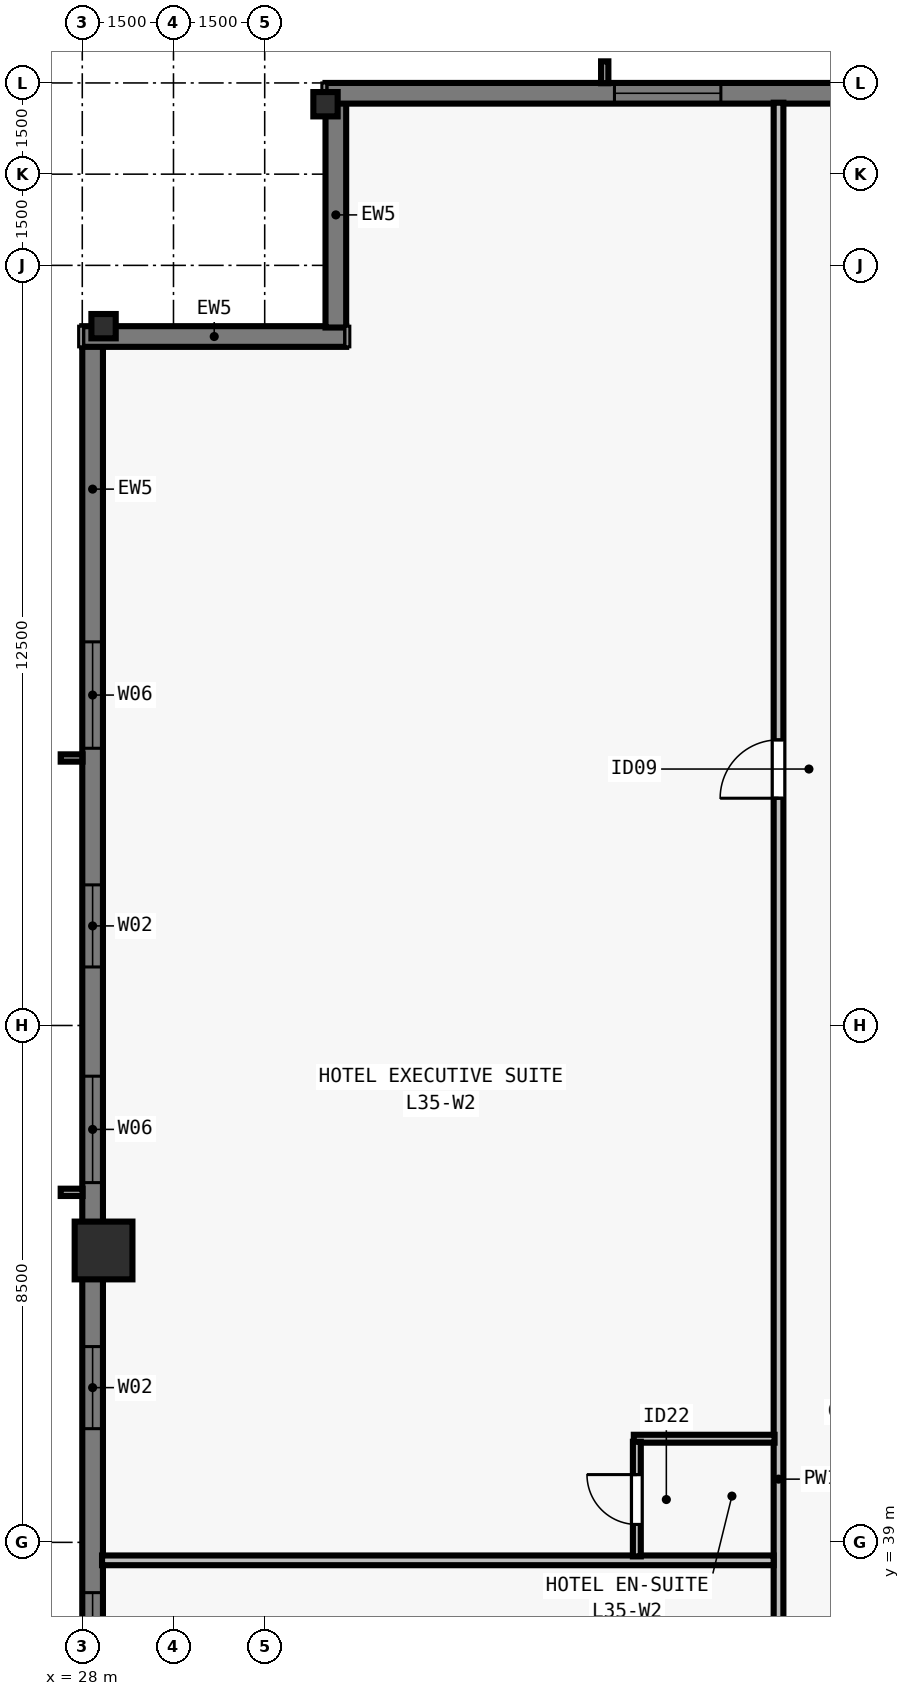
"""IFC4 building model, lengths in metres.
Left out: names, types, materials, properties, quantities, classifications, styles, units other than length and angle.
Written with IfcOpenShell. Run it as: python <this file> out.ifc"""

import sys

from ifc_helpers import new_model, si_unit, direction, frame, frame_2d, origin, origin_2d, place, context, subcontext, project, spatial, rectangle, i_section, extrude, element, fill, save


model = new_model("IFC4")
c1 = context("Model", 3, precision=1e-05, world=origin(), true_north=direction((0.0, 1.0)))
c2 = subcontext(c1, "Body", "Model", "MODEL_VIEW")
j1 = project(units=[si_unit("LENGTHUNIT", "METRE"), si_unit("PLANEANGLEUNIT", "RADIAN")], contexts=[c1])
p1 = place(None, origin())
s1 = spatial("IfcSite", under=j1, at=p1, CompositionType="ELEMENT")
p2 = place(p1, origin())
s2 = spatial("IfcBuilding", under=s1, at=p2, CompositionType="ELEMENT")
p3 = place(p2, frame((0.0, 0.0, 130.5)))
s3 = spatial("IfcBuildingStorey", under=s2, at=p3, CompositionType="ELEMENT", Elevation=130.5)
for number, where, z_axis, x_axis in (
    (1, (32.0, 62.65, 0.0), (0.0, 0.0, 1.0), (1.0, 0.0, 0.0)),
    (2, (28.35, 59.0, 0.0), (0.0, 0.0, 1.0), (0.0, 1.0, 0.0)),
):
    element("IfcColumn", number, at=place(p3, frame(where, z_axis=z_axis, x_axis=x_axis)), inside=s3, PredefinedType="COLUMN", context=c2, shape_type="SweptSolid", body=[
        extrude(i_section(OverallWidth=0.4, OverallDepth=0.4, WebThickness=0.022, FlangeThickness=0.036, at=origin_2d()), origin(), (0.0, 0.0, 1.0), 3.5),
    ])
p4 = place(p3, frame((28.35, 43.8, 0.0), z_axis=(0.0, 0.0, 1.0), x_axis=(0.0, 1.0, 0.0)))
e3 = element("IfcColumn", 3, at=p4, inside=s3, PredefinedType="COLUMN", context=c2, shape_type="SweptSolid", body=[
    extrude(rectangle(XDim=0.95, YDim=0.95, at=origin_2d()), origin(), (0.0, 0.0, 1.0), 3.5),
])
p5 = place(p3, frame((28.17, 32.0, 0.0), z_axis=(0.0, 0.0, 1.0), x_axis=(0.0, 1.0, 0.0)))
e4 = element("IfcWall", 4, at=p5, inside=s3, PredefinedType="SOLIDWALL", context=c2, shape_type="SweptSolid", body=[
    extrude(rectangle(XDim=26.682, YDim=0.34, at=frame_2d((13.341, 0.0))), origin(), (0.0, 0.0, 1.0), 3.28),
])
p6 = place(p5, frame((4.423, 0.0, 0.8)))
e5 = element("IfcOpeningElement", 5, at=p6, cuts=e4, PredefinedType="OPENING", context=c2, shape_type="SweptSolid", body=[
    extrude(rectangle(XDim=1.75, YDim=1.66, at=frame_2d((0.875, 0.83))), frame((0.0, 0.18, 0.0), z_axis=(0.0, -1.0, 0.0), x_axis=(1.0, 0.0, 0.0)), (0.0, 0.0, 1.0), 0.36),
])
p7 = place(p5, frame((8.87, 0.0, 0.8)))
e6 = element("IfcOpeningElement", 6, at=p7, cuts=e4, PredefinedType="OPENING", context=c2, shape_type="SweptSolid", body=[
    extrude(rectangle(XDim=1.35, YDim=1.66, at=frame_2d((0.675, 0.83))), frame((0.0, 0.18, 0.0), z_axis=(0.0, -1.0, 0.0), x_axis=(1.0, 0.0, 0.0)), (0.0, 0.0, 1.0), 0.36),
])
p8 = place(p5, frame((12.916, 0.0, 0.8)))
e7 = element("IfcOpeningElement", 7, at=p8, cuts=e4, PredefinedType="OPENING", context=c2, shape_type="SweptSolid", body=[
    extrude(rectangle(XDim=1.75, YDim=1.66, at=frame_2d((0.875, 0.83))), frame((0.0, 0.18, 0.0), z_axis=(0.0, -1.0, 0.0), x_axis=(1.0, 0.0, 0.0)), (0.0, 0.0, 1.0), 0.36),
])
p9 = place(p5, frame((16.462, 0.0, 0.8)))
e8 = element("IfcOpeningElement", 8, at=p9, cuts=e4, PredefinedType="OPENING", context=c2, shape_type="SweptSolid", body=[
    extrude(rectangle(XDim=1.35, YDim=1.66, at=frame_2d((0.675, 0.83))), frame((0.0, 0.18, 0.0), z_axis=(0.0, -1.0, 0.0), x_axis=(1.0, 0.0, 0.0)), (0.0, 0.0, 1.0), 0.36),
])
p10 = place(p5, frame((20.059, 0.0, 0.8)))
e9 = element("IfcOpeningElement", 9, at=p10, cuts=e4, PredefinedType="OPENING", context=c2, shape_type="SweptSolid", body=[
    extrude(rectangle(XDim=1.75, YDim=1.66, at=frame_2d((0.875, 0.83))), frame((0.0, 0.18, 0.0), z_axis=(0.0, -1.0, 0.0), x_axis=(1.0, 0.0, 0.0)), (0.0, 0.0, 1.0), 0.36),
])
p11 = place(p3, frame((28.0, 58.83, 0.0), z_axis=(0.0, 0.0, 1.0), x_axis=(1.0, 0.0, 0.0)))
e10 = element("IfcWall", 10, at=p11, inside=s3, PredefinedType="SOLIDWALL", context=c2, shape_type="SweptSolid", body=[
    extrude(rectangle(XDim=4.34, YDim=0.34, at=frame_2d((2.17, 0.0))), origin(), (0.0, 0.0, 1.0), 3.28),
])
p12 = place(p3, frame((32.17, 58.978, 0.0), z_axis=(0.0, 0.0, 1.0), x_axis=(0.0, 1.0, 0.0)))
e11 = element("IfcWall", 11, at=p12, inside=s3, PredefinedType="SOLIDWALL", context=c2, shape_type="SweptSolid", body=[
    extrude(rectangle(XDim=3.704, YDim=0.34, at=frame_2d((1.852, 0.0))), origin(), (0.0, 0.0, 1.0), 3.28),
])
p13 = place(p3, frame((32.0, 62.83, 0.0), z_axis=(0.0, 0.0, 1.0), x_axis=(1.0, 0.0, 0.0)))
e12 = element("IfcWall", 12, at=p13, inside=s3, PredefinedType="SOLIDWALL", context=c2, shape_type="SweptSolid", body=[
    extrude(rectangle(XDim=39.682, YDim=0.34, at=frame_2d((19.841, 0.0))), origin(), (0.0, 0.0, 1.0), 3.28),
])
p14 = place(p13, frame((4.752, 0.0, 0.8)))
e13 = element("IfcOpeningElement", 13, at=p14, cuts=e12, PredefinedType="OPENING", context=c2, shape_type="SweptSolid", body=[
    extrude(rectangle(XDim=1.75, YDim=1.66, at=frame_2d((0.875, 0.83))), frame((0.0, 0.18, 0.0), z_axis=(0.0, -1.0, 0.0), x_axis=(1.0, 0.0, 0.0)), (0.0, 0.0, 1.0), 0.36),
])
p15 = place(p13, frame((11.859, 0.0, 0.8)))
e14 = element("IfcOpeningElement", 14, at=p15, cuts=e12, PredefinedType="OPENING", context=c2, shape_type="SweptSolid", body=[
    extrude(rectangle(XDim=1.75, YDim=1.66, at=frame_2d((0.875, 0.83))), frame((0.0, 0.18, 0.0), z_axis=(0.0, -1.0, 0.0), x_axis=(1.0, 0.0, 0.0)), (0.0, 0.0, 1.0), 0.36),
])
p16 = place(p13, frame((16.062, 0.0, 0.8)))
e15 = element("IfcOpeningElement", 15, at=p16, cuts=e12, PredefinedType="OPENING", context=c2, shape_type="SweptSolid", body=[
    extrude(rectangle(XDim=1.35, YDim=1.66, at=frame_2d((0.675, 0.83))), frame((0.0, 0.18, 0.0), z_axis=(0.0, -1.0, 0.0), x_axis=(1.0, 0.0, 0.0)), (0.0, 0.0, 1.0), 0.36),
])
p17 = place(p13, frame((18.966, 0.0, 0.8)))
e16 = element("IfcOpeningElement", 16, at=p17, cuts=e12, PredefinedType="OPENING", context=c2, shape_type="SweptSolid", body=[
    extrude(rectangle(XDim=1.75, YDim=1.66, at=frame_2d((0.875, 0.83))), frame((0.0, 0.18, 0.0), z_axis=(0.0, -1.0, 0.0), x_axis=(1.0, 0.0, 0.0)), (0.0, 0.0, 1.0), 0.36),
])
p18 = place(p13, frame((22.719, 0.0, 0.8)))
e17 = element("IfcOpeningElement", 17, at=p18, cuts=e12, PredefinedType="OPENING", context=c2, shape_type="SweptSolid", body=[
    extrude(rectangle(XDim=1.35, YDim=1.66, at=frame_2d((0.675, 0.83))), frame((0.0, 0.18, 0.0), z_axis=(0.0, -1.0, 0.0), x_axis=(1.0, 0.0, 0.0)), (0.0, 0.0, 1.0), 0.36),
])
p19 = place(p13, frame((26.073, 0.0, 0.8)))
e18 = element("IfcOpeningElement", 18, at=p19, cuts=e12, PredefinedType="OPENING", context=c2, shape_type="SweptSolid", body=[
    extrude(rectangle(XDim=1.75, YDim=1.66, at=frame_2d((0.875, 0.83))), frame((0.0, 0.18, 0.0), z_axis=(0.0, -1.0, 0.0), x_axis=(1.0, 0.0, 0.0)), (0.0, 0.0, 1.0), 0.36),
])
p20 = place(p13, frame((29.827, 0.0, 0.8)))
e19 = element("IfcOpeningElement", 19, at=p20, cuts=e12, PredefinedType="OPENING", context=c2, shape_type="SweptSolid", body=[
    extrude(rectangle(XDim=1.35, YDim=1.66, at=frame_2d((0.675, 0.83))), frame((0.0, 0.18, 0.0), z_axis=(0.0, -1.0, 0.0), x_axis=(1.0, 0.0, 0.0)), (0.0, 0.0, 1.0), 0.36),
])
p21 = place(p13, frame((34.23, 0.0, 0.8)))
e20 = element("IfcOpeningElement", 20, at=p21, cuts=e12, PredefinedType="OPENING", context=c2, shape_type="SweptSolid", body=[
    extrude(rectangle(XDim=0.9, YDim=1.66, at=frame_2d((0.45, 0.83))), frame((0.0, 0.18, 0.0), z_axis=(0.0, -1.0, 0.0), x_axis=(1.0, 0.0, 0.0)), (0.0, 0.0, 1.0), 0.36),
])
p22 = place(p3, frame((39.45, 15.325, 0.0), z_axis=(0.0, 0.0, 1.0), x_axis=(0.0, 1.0, 0.0)))
e21 = element("IfcWall", 21, at=p22, inside=s3, PredefinedType="PARTITIONING", context=c2, shape_type="SweptSolid", body=[
    extrude(rectangle(XDim=47.35, YDim=0.16, at=frame_2d((23.675, 0.0))), origin(), (0.0, 0.0, 1.0), 2.555),
])
p23 = place(p22, frame((12.557, 0.0, 0.0)))
e22 = element("IfcOpeningElement", 22, at=p23, cuts=e21, PredefinedType="OPENING", context=c2, shape_type="SweptSolid", body=[
    extrude(rectangle(XDim=0.96, YDim=2.15, at=frame_2d((0.48, 1.075))), frame((0.0, 0.09, 0.0), z_axis=(0.0, -1.0, 0.0), x_axis=(1.0, 0.0, 0.0)), (0.0, 0.0, 1.0), 0.18),
])
p24 = place(p22, frame((35.912, 0.0, 0.0)))
e23 = element("IfcOpeningElement", 23, at=p24, cuts=e21, PredefinedType="OPENING", context=c2, shape_type="SweptSolid", body=[
    extrude(rectangle(XDim=0.96, YDim=2.15, at=frame_2d((0.48, 1.075))), frame((0.0, 0.09, 0.0), z_axis=(0.0, -1.0, 0.0), x_axis=(1.0, 0.0, 0.0)), (0.0, 0.0, 1.0), 0.18),
])
p25 = place(p3, frame((28.325, 38.704, 0.0), z_axis=(0.0, 0.0, 1.0), x_axis=(1.0, 0.0, 0.0)))
e24 = element("IfcWall", 24, at=p25, inside=s3, PredefinedType="PARTITIONING", context=c2, shape_type="SweptSolid", body=[
    extrude(rectangle(XDim=11.045, YDim=0.16, at=frame_2d((5.522, 0.0))), origin(), (0.0, 0.0, 1.0), 2.896),
])
p26 = place(p3, frame((37.07, 40.704, 0.0), z_axis=(0.0, 0.0, 1.0), x_axis=(1.0, 0.0, 0.0)))
e25 = element("IfcWall", 25, at=p26, inside=s3, PredefinedType="PLUMBINGWALL", context=c2, shape_type="SweptSolid", body=[
    extrude(rectangle(XDim=2.315, YDim=0.13, at=frame_2d((1.157, 0.0))), origin(), (0.0, 0.0, 1.0), 3.28),
])
p27 = place(p3, frame((37.12, 38.769, 0.0), z_axis=(0.0, 0.0, 1.0), x_axis=(0.0, 1.0, 0.0)))
e26 = element("IfcWall", 26, at=p27, inside=s3, PredefinedType="PLUMBINGWALL", context=c2, shape_type="SweptSolid", body=[
    extrude(rectangle(XDim=1.885, YDim=0.13, at=frame_2d((0.942, 0.0))), origin(), (0.0, 0.0, 1.0), 3.28),
])
p28 = place(p27, frame((0.525, 0.0, 0.0)))
e27 = element("IfcOpeningElement", 27, at=p28, cuts=e26, PredefinedType="OPENING", context=c2, shape_type="SweptSolid", body=[
    extrude(rectangle(XDim=0.82, YDim=2.1, at=frame_2d((0.41, 1.05))), frame((0.0, 0.075, 0.0), z_axis=(0.0, -1.0, 0.0), x_axis=(1.0, 0.0, 0.0)), (0.0, 0.0, 1.0), 0.15),
])
p29 = place(p6, origin())
e28 = element("IfcWindow", 28, at=p29, inside=s3, PartitioningType="SINGLE_PANEL", PredefinedType="WINDOW", context=c2, shape_type="SweptSolid", body=[
    extrude(rectangle(XDim=1.75, YDim=1.66, at=frame_2d((0.875, 0.83))), frame((0.0, -0.05, 0.0), z_axis=(0.0, -1.0, 0.0), x_axis=(1.0, 0.0, 0.0)), (0.0, 0.0, 1.0), 0.06),
])
fill(e5, e28)
p30 = place(p7, origin())
e29 = element("IfcWindow", 29, at=p30, inside=s3, PartitioningType="SINGLE_PANEL", PredefinedType="WINDOW", context=c2, shape_type="SweptSolid", body=[
    extrude(rectangle(XDim=1.35, YDim=1.66, at=frame_2d((0.675, 0.83))), frame((0.0, -0.05, 0.0), z_axis=(0.0, -1.0, 0.0), x_axis=(1.0, 0.0, 0.0)), (0.0, 0.0, 1.0), 0.06),
])
fill(e6, e29)
p31 = place(p8, origin())
e30 = element("IfcWindow", 30, at=p31, inside=s3, PartitioningType="SINGLE_PANEL", PredefinedType="WINDOW", context=c2, shape_type="SweptSolid", body=[
    extrude(rectangle(XDim=1.75, YDim=1.66, at=frame_2d((0.875, 0.83))), frame((0.0, -0.05, 0.0), z_axis=(0.0, -1.0, 0.0), x_axis=(1.0, 0.0, 0.0)), (0.0, 0.0, 1.0), 0.06),
])
fill(e7, e30)
p32 = place(p9, origin())
e31 = element("IfcWindow", 31, at=p32, inside=s3, PartitioningType="SINGLE_PANEL", PredefinedType="WINDOW", context=c2, shape_type="SweptSolid", body=[
    extrude(rectangle(XDim=1.35, YDim=1.66, at=frame_2d((0.675, 0.83))), frame((0.0, -0.05, 0.0), z_axis=(0.0, -1.0, 0.0), x_axis=(1.0, 0.0, 0.0)), (0.0, 0.0, 1.0), 0.06),
])
fill(e8, e31)
p33 = place(p10, origin())
e32 = element("IfcWindow", 32, at=p33, inside=s3, PartitioningType="SINGLE_PANEL", PredefinedType="WINDOW", context=c2, shape_type="SweptSolid", body=[
    extrude(rectangle(XDim=1.75, YDim=1.66, at=frame_2d((0.875, 0.83))), frame((0.0, -0.05, 0.0), z_axis=(0.0, -1.0, 0.0), x_axis=(1.0, 0.0, 0.0)), (0.0, 0.0, 1.0), 0.06),
])
fill(e9, e32)
p34 = place(p14, origin())
e33 = element("IfcWindow", 33, at=p34, inside=s3, PartitioningType="SINGLE_PANEL", PredefinedType="WINDOW", context=c2, shape_type="SweptSolid", body=[
    extrude(rectangle(XDim=1.75, YDim=1.66, at=frame_2d((0.875, 0.83))), frame((0.0, -0.05, 0.0), z_axis=(0.0, -1.0, 0.0), x_axis=(1.0, 0.0, 0.0)), (0.0, 0.0, 1.0), 0.06),
])
fill(e13, e33)
p35 = place(p28, origin())
e34 = element("IfcDoor", 34, at=p35, inside=s3, OperationType="SINGLE_SWING_RIGHT", PredefinedType="DOOR", context=c2, shape_type="SweptSolid", body=[
    extrude(rectangle(XDim=0.82, YDim=2.1, at=frame_2d((0.41, 1.05))), frame((0.0, 0.025, 0.0), z_axis=(0.0, -1.0, 0.0), x_axis=(1.0, 0.0, 0.0)), (0.0, 0.0, 1.0), 0.05),
])
fill(e27, e34)
p36 = place(p24, origin())
e35 = element("IfcDoor", 35, at=p36, inside=s3, OperationType="SINGLE_SWING_LEFT", PredefinedType="DOOR", context=c2, shape_type="SweptSolid", body=[
    extrude(rectangle(XDim=0.96, YDim=2.15, at=frame_2d((0.48, 1.075))), frame((0.0, 0.025, 0.0), z_axis=(0.0, -1.0, 0.0), x_axis=(1.0, 0.0, 0.0)), (0.0, 0.0, 1.0), 0.05),
])
fill(e23, e35)
save(model, sys.argv[1])
